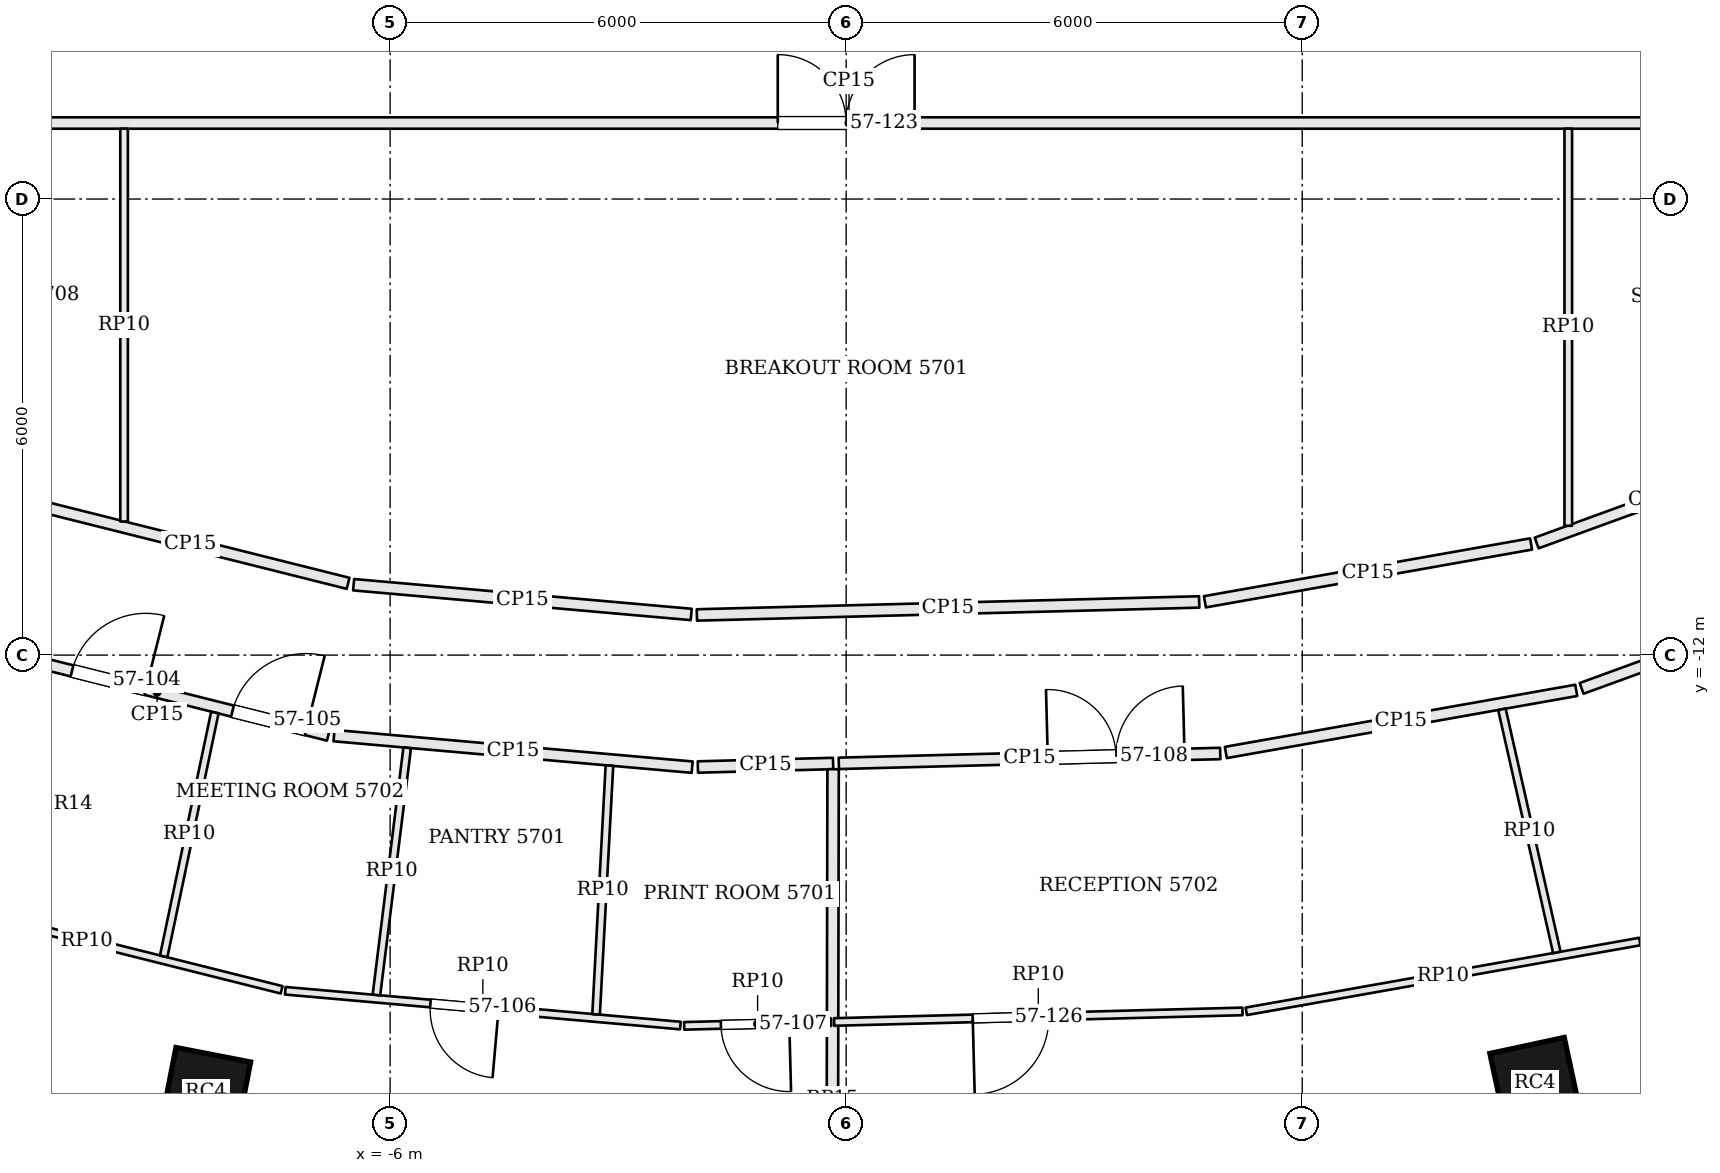
"""IFC4 building model, lengths in metres.
Left out: names, types, materials, properties, quantities, classifications, styles, units other than length and angle.
Written with IfcOpenShell. Run it as: python <this file> out.ifc"""

import sys

from ifc_helpers import new_model, si_unit, direction, frame, frame_2d, origin, origin_2d, place, context, subcontext, project, spatial, rectangle, extrude, element, fill, save


model = new_model("IFC4")
c1 = context("Model", 3, precision=1e-05, world=origin(), true_north=direction((0.0, 1.0)))
c2 = subcontext(c1, "Body", "Model", "MODEL_VIEW")
j1 = project(units=[si_unit("LENGTHUNIT", "METRE"), si_unit("PLANEANGLEUNIT", "RADIAN")], contexts=[c1])
p1 = place(None, origin())
s1 = spatial("IfcSite", under=j1, at=p1, CompositionType="ELEMENT")
p2 = place(p1, origin())
s2 = spatial("IfcBuilding", under=s1, at=p2, CompositionType="ELEMENT")
p3 = place(p2, frame((0.0, 0.0, 233.1)))
s3 = spatial("IfcBuildingStorey", under=s2, at=p3, CompositionType="ELEMENT", Elevation=233.1)
for number, where, z_axis, x_axis in (
    (1, (-8.422, -17.749, 0.0), (0.0, 0.0, 1.0), (0.982, -0.191, 0.0)),
    (2, (9.063, -17.625, 0.0), (0.0, 0.0, 1.0), (0.978, 0.21, 0.0)),
):
    element("IfcColumn", number, at=place(p3, frame(where, z_axis=z_axis, x_axis=x_axis)), inside=s3, PredefinedType="COLUMN", context=c2, shape_type="SweptSolid", body=[
        extrude(rectangle(XDim=1.0, YDim=1.0, at=origin_2d()), origin(), (0.0, 0.0, 1.0), 3.9),
    ])
p4 = place(p3, frame((-12.719, -17.526, 0.0), z_axis=(0.0, 0.0, 1.0), x_axis=(0.898643806462, -0.438679050226, 0.0)))
e3 = element("IfcWall", 3, at=p4, inside=s3, PredefinedType="SOLIDWALL", context=c2, shape_type="SweptSolid", body=[
    extrude(rectangle(XDim=2.523, YDim=0.45, at=frame_2d((1.262, 0.0))), origin(), (0.0, 0.0, 1.0), 3.7),
])
p5 = place(p4, frame((0.212, 0.0, 0.9)))
e4 = element("IfcOpeningElement", 4, at=p5, cuts=e3, PredefinedType="OPENING", context=c2, shape_type="SweptSolid", body=[
    extrude(rectangle(XDim=2.1, YDim=2.3, at=frame_2d((1.05, 1.15))), frame((0.0, 0.235, 0.0), z_axis=(0.0, -1.0, 0.0), x_axis=(1.0, 0.0, 0.0)), (0.0, 0.0, 1.0), 0.47),
])
p6 = place(p3, frame((-11.319, -11.923, 0.0), z_axis=(0.0, 0.0, 1.0), x_axis=(0.969990815038, -0.243141561114, 0.0)))
e5 = element("IfcWall", 5, at=p6, inside=s3, PredefinedType="PARTITIONING", context=c2, shape_type="SweptSolid", body=[
    extrude(rectangle(XDim=4.645, YDim=0.15, at=frame_2d((2.323, 0.0))), origin(), (0.0, 0.0, 1.0), 3.084),
])
p7 = place(p6, frame((1.169, 0.0, 0.0)))
e6 = element("IfcOpeningElement", 6, at=p7, cuts=e5, PredefinedType="OPENING", context=c2, shape_type="SweptSolid", body=[
    extrude(rectangle(XDim=1.0, YDim=2.4, at=frame_2d((0.5, 1.2))), frame((0.0, 0.085, 0.0), z_axis=(0.0, -1.0, 0.0), x_axis=(1.0, 0.0, 0.0)), (0.0, 0.0, 1.0), 0.17),
])
p8 = place(p6, frame((3.345, 0.0, 0.0)))
e7 = element("IfcOpeningElement", 7, at=p8, cuts=e5, PredefinedType="OPENING", context=c2, shape_type="SweptSolid", body=[
    extrude(rectangle(XDim=1.0, YDim=2.4, at=frame_2d((0.5, 1.2))), frame((0.0, 0.085, 0.0), z_axis=(0.0, -1.0, 0.0), x_axis=(1.0, 0.0, 0.0)), (0.0, 0.0, 1.0), 0.17),
])
p9 = place(p3, frame((-6.738, -13.059, 0.0), z_axis=(0.0, 0.0, 1.0), x_axis=(0.996143527037, -0.087738666181, 0.0)))
e8 = element("IfcWall", 8, at=p9, inside=s3, PredefinedType="PARTITIONING", context=c2, shape_type="SweptSolid", body=[
    extrude(rectangle(XDim=4.73, YDim=0.15, at=frame_2d((2.365, 0.0))), origin(), (0.0, 0.0, 1.0), 3.084),
])
p10 = place(p3, frame((-1.951, -13.472, 0.0), z_axis=(0.0, 0.0, 1.0), x_axis=(0.999660344096, 0.026061397555, 0.0)))
e9 = element("IfcWall", 9, at=p10, inside=s3, PredefinedType="PARTITIONING", context=c2, shape_type="SweptSolid", body=[
    extrude(rectangle(XDim=1.78, YDim=0.15, at=frame_2d((0.89, 0.0))), origin(), (0.0, 0.0, 1.0), 3.084),
])
p11 = place(p3, frame((-0.189, -22.19, 0.0), z_axis=(0.0, 0.0, 1.0), x_axis=(0.001966951348, 0.999998065549, 0.0)))
e10 = element("IfcWall", 10, at=p11, inside=s3, PredefinedType="PARTITIONING", context=c2, shape_type="SweptSolid", body=[
    extrude(rectangle(XDim=8.688, YDim=0.15, at=frame_2d((4.344, 0.0))), origin(), (0.0, 0.0, 1.0), 3.084),
])
p12 = place(p3, frame((-0.097, -13.424, 0.0), z_axis=(0.0, 0.0, 1.0), x_axis=(0.999663943149, 0.025922977605, 0.0)))
e11 = element("IfcWall", 11, at=p12, inside=s3, PredefinedType="PARTITIONING", context=c2, shape_type="SweptSolid", body=[
    extrude(rectangle(XDim=5.02, YDim=0.15, at=frame_2d((2.51, 0.0))), origin(), (0.0, 0.0, 1.0), 3.084),
])
p13 = place(p12, frame((2.75, 0.0, 0.0)))
e12 = element("IfcOpeningElement", 12, at=p13, cuts=e11, PredefinedType="OPENING", context=c2, shape_type="SweptSolid", body=[
    extrude(rectangle(XDim=1.8, YDim=2.1, at=frame_2d((0.9, 1.05))), frame((0.0, 0.085, 0.0), z_axis=(0.0, -1.0, 0.0), x_axis=(1.0, 0.0, 0.0)), (0.0, 0.0, 1.0), 0.17),
])
p14 = place(p3, frame((4.995, -13.281, 0.0), z_axis=(0.0, 0.0, 1.0), x_axis=(0.98463411377, 0.174630071865, 0.0)))
e13 = element("IfcWall", 13, at=p14, inside=s3, PredefinedType="PARTITIONING", context=c2, shape_type="SweptSolid", body=[
    extrude(rectangle(XDim=4.682, YDim=0.15, at=frame_2d((2.341, 0.0))), origin(), (0.0, 0.0, 1.0), 3.084),
])
p15 = place(p3, frame((9.676, -12.438, 0.0), z_axis=(0.0, 0.0, 1.0), x_axis=(0.939640289748, 0.342163887461, 0.0)))
e14 = element("IfcWall", 14, at=p15, inside=s3, PredefinedType="PARTITIONING", context=c2, shape_type="SweptSolid", body=[
    extrude(rectangle(XDim=3.68, YDim=0.15, at=frame_2d((1.84, 0.0))), origin(), (0.0, 0.0, 1.0), 3.084),
])
p16 = place(p15, frame((1.337, 0.0, 0.0)))
e15 = element("IfcOpeningElement", 15, at=p16, cuts=e14, PredefinedType="OPENING", context=c2, shape_type="SweptSolid", body=[
    extrude(rectangle(XDim=1.0, YDim=2.4, at=frame_2d((0.5, 1.2))), frame((0.0, 0.085, 0.0), z_axis=(0.0, -1.0, 0.0), x_axis=(1.0, 0.0, 0.0)), (0.0, 0.0, 1.0), 0.17),
])
p17 = place(p3, frame((12.178, -9.398, 0.0), z_axis=(0.0, 0.0, 1.0), x_axis=(-0.939609240084, -0.342249143093, 0.0)))
e16 = element("IfcWall", 16, at=p17, inside=s3, PredefinedType="PARTITIONING", context=c2, shape_type="SweptSolid", body=[
    extrude(rectangle(XDim=3.292, YDim=0.15, at=frame_2d((1.646, 0.0))), origin(), (0.0, 0.0, 1.0), 3.084),
])
p18 = place(p3, frame((9.01, -10.538, 0.0), z_axis=(0.0, 0.0, 1.0), x_axis=(-0.984645638575, -0.174565077936, 0.0)))
e17 = element("IfcWall", 17, at=p18, inside=s3, PredefinedType="PARTITIONING", context=c2, shape_type="SweptSolid", body=[
    extrude(rectangle(XDim=4.358, YDim=0.15, at=frame_2d((2.179, 0.0))), origin(), (0.0, 0.0, 1.0), 3.084),
])
p19 = place(p3, frame((4.645, -11.301, 0.0), z_axis=(0.0, 0.0, 1.0), x_axis=(-0.9996648469, -0.02588810291, 0.0)))
e18 = element("IfcWall", 18, at=p19, inside=s3, PredefinedType="PARTITIONING", context=c2, shape_type="SweptSolid", body=[
    extrude(rectangle(XDim=6.611, YDim=0.15, at=frame_2d((3.305, 0.0))), origin(), (0.0, 0.0, 1.0), 3.084),
])
p20 = place(p3, frame((-2.039, -11.465, 0.0), z_axis=(0.0, 0.0, 1.0), x_axis=(-0.996139855484, 0.087780341286, 0.0)))
e19 = element("IfcWall", 19, at=p20, inside=s3, PredefinedType="PARTITIONING", context=c2, shape_type="SweptSolid", body=[
    extrude(rectangle(XDim=4.458, YDim=0.15, at=frame_2d((2.229, 0.0))), origin(), (0.0, 0.0, 1.0), 3.084),
])
p21 = place(p3, frame((-6.553, -11.056, 0.0), z_axis=(0.0, 0.0, 1.0), x_axis=(-0.970004917182, 0.243085294995, 0.0)))
e20 = element("IfcWall", 20, at=p21, inside=s3, PredefinedType="PARTITIONING", context=c2, shape_type="SweptSolid", body=[
    extrude(rectangle(XDim=4.284, YDim=0.15, at=frame_2d((2.142, 0.0))), origin(), (0.0, 0.0, 1.0), 3.084),
])
p22 = place(p3, frame((-14.925, -5.0, 0.0), z_axis=(0.0, 0.0, 1.0), x_axis=(1.0, 0.0, 0.0)))
e21 = element("IfcWall", 21, at=p22, inside=s3, PredefinedType="PARTITIONING", context=c2, shape_type="SweptSolid", body=[
    extrude(rectangle(XDim=29.925, YDim=0.15, at=frame_2d((14.962, 0.0))), origin(), (0.0, 0.0, 1.0), 3.084),
])
p23 = place(p22, frame((2.175, 0.0, 0.0)))
e22 = element("IfcOpeningElement", 22, at=p23, cuts=e21, PredefinedType="OPENING", context=c2, shape_type="SweptSolid", body=[
    extrude(rectangle(XDim=1.0, YDim=2.4, at=frame_2d((0.5, 1.2))), frame((0.0, 0.085, 0.0), z_axis=(0.0, -1.0, 0.0), x_axis=(1.0, 0.0, 0.0)), (0.0, 0.0, 1.0), 0.17),
])
p24 = place(p22, frame((14.025, 0.0, 0.0)))
e23 = element("IfcOpeningElement", 23, at=p24, cuts=e21, PredefinedType="OPENING", context=c2, shape_type="SweptSolid", body=[
    extrude(rectangle(XDim=1.8, YDim=2.1, at=frame_2d((0.9, 1.05))), frame((0.0, 0.085, 0.0), z_axis=(0.0, -1.0, 0.0), x_axis=(1.0, 0.0, 0.0)), (0.0, 0.0, 1.0), 0.17),
])
p25 = place(p22, frame((26.825, 0.0, 0.0)))
e24 = element("IfcOpeningElement", 24, at=p25, cuts=e21, PredefinedType="OPENING", context=c2, shape_type="SweptSolid", body=[
    extrude(rectangle(XDim=0.7, YDim=2.1, at=frame_2d((0.35, 1.05))), frame((0.0, 0.085, 0.0), z_axis=(0.0, -1.0, 0.0), x_axis=(1.0, 0.0, 0.0)), (0.0, 0.0, 1.0), 0.17),
])
p26 = place(p3, frame((-0.198, -16.828, 0.0), z_axis=(0.0, 0.0, 1.0), x_axis=(-0.999665012606, -0.025881703408, 0.0)))
e25 = element("IfcWall", 25, at=p26, inside=s3, PredefinedType="PARTITIONING", context=c2, shape_type="SweptSolid", body=[
    extrude(rectangle(XDim=1.934, YDim=0.1, at=frame_2d((0.967, 0.0))), origin(), (0.0, 0.0, 1.0), 3.084),
])
p27 = place(p26, frame((0.55, 0.0, 0.0)))
e26 = element("IfcOpeningElement", 26, at=p27, cuts=e25, PredefinedType="OPENING", context=c2, shape_type="SweptSolid", body=[
    extrude(rectangle(XDim=0.9, YDim=2.1, at=frame_2d((0.45, 1.05))), frame((0.0, 0.06, 0.0), z_axis=(0.0, -1.0, 0.0), x_axis=(1.0, 0.0, 0.0)), (0.0, 0.0, 1.0), 0.12),
])
p28 = place(p3, frame((-2.181, -16.874, 0.0), z_axis=(0.0, 0.0, 1.0), x_axis=(-0.996143934904, 0.087734035321, 0.0)))
e27 = element("IfcWall", 27, at=p28, inside=s3, PredefinedType="PARTITIONING", context=c2, shape_type="SweptSolid", body=[
    extrude(rectangle(XDim=5.218, YDim=0.1, at=frame_2d((2.609, 0.0))), origin(), (0.0, 0.0, 1.0), 3.084),
])
p29 = place(p28, frame((2.401, 0.0, 0.0)))
e28 = element("IfcOpeningElement", 28, at=p29, cuts=e27, PredefinedType="OPENING", context=c2, shape_type="SweptSolid", body=[
    extrude(rectangle(XDim=0.9, YDim=2.1, at=frame_2d((0.45, 1.05))), frame((0.0, 0.06, 0.0), z_axis=(0.0, -1.0, 0.0), x_axis=(1.0, 0.0, 0.0)), (0.0, 0.0, 1.0), 0.12),
])
p30 = place(p3, frame((-7.427, -16.404, 0.0), z_axis=(0.0, 0.0, 1.0), x_axis=(-0.970009158253, 0.243068370845, 0.0)))
e29 = element("IfcWall", 29, at=p30, inside=s3, PredefinedType="PARTITIONING", context=c2, shape_type="SweptSolid", body=[
    extrude(rectangle(XDim=5.283, YDim=0.1, at=frame_2d((2.642, 0.0))), origin(), (0.0, 0.0, 1.0), 3.084),
])
p31 = place(p3, frame((-8.306, -12.756, 0.0), z_axis=(0.0, 0.0, 1.0), x_axis=(-0.205432339041, -0.978671320759, 0.0)))
e30 = element("IfcWall", 30, at=p31, inside=s3, PredefinedType="PARTITIONING", context=c2, shape_type="SweptSolid", body=[
    extrude(rectangle(XDim=3.278, YDim=0.1, at=frame_2d((1.639, 0.0))), origin(), (0.0, 0.0, 1.0), 3.084),
])
p32 = place(p3, frame((-5.775, -13.219, 0.0), z_axis=(0.0, 0.0, 1.0), x_axis=(-0.123512108853, -0.992343065158, 0.0)))
e31 = element("IfcWall", 31, at=p32, inside=s3, PredefinedType="PARTITIONING", context=c2, shape_type="SweptSolid", body=[
    extrude(rectangle(XDim=3.277, YDim=0.1, at=frame_2d((1.639, 0.0))), origin(), (0.0, 0.0, 1.0), 3.084),
])
p33 = place(p3, frame((-3.115, -13.454, 0.0), z_axis=(0.0, 0.0, 1.0), x_axis=(-0.053567684459, -0.99856422086, 0.0)))
e32 = element("IfcWall", 32, at=p33, inside=s3, PredefinedType="PARTITIONING", context=c2, shape_type="SweptSolid", body=[
    extrude(rectangle(XDim=3.277, YDim=0.1, at=frame_2d((1.638, 0.0))), origin(), (0.0, 0.0, 1.0), 3.084),
])
p34 = place(p3, frame((10.441, -15.769, 0.0), z_axis=(0.0, 0.0, 1.0), x_axis=(-0.984642067447, -0.174585219919, 0.0)))
e33 = element("IfcWall", 33, at=p34, inside=s3, PredefinedType="PARTITIONING", context=c2, shape_type="SweptSolid", body=[
    extrude(rectangle(XDim=5.258, YDim=0.1, at=frame_2d((2.629, 0.0))), origin(), (0.0, 0.0, 1.0), 3.084),
])
p35 = place(p3, frame((5.214, -16.688, 0.0), z_axis=(0.0, 0.0, 1.0), x_axis=(-0.999664711209, -0.025893342061, 0.0)))
e34 = element("IfcWall", 34, at=p35, inside=s3, PredefinedType="PARTITIONING", context=c2, shape_type="SweptSolid", body=[
    extrude(rectangle(XDim=5.374, YDim=0.1, at=frame_2d((2.687, 0.0))), origin(), (0.0, 0.0, 1.0), 3.084),
])
p36 = place(p35, frame((2.55, 0.0, 0.0)))
e35 = element("IfcOpeningElement", 35, at=p36, cuts=e34, PredefinedType="OPENING", context=c2, shape_type="SweptSolid", body=[
    extrude(rectangle(XDim=1.0, YDim=2.1, at=frame_2d((0.5, 1.05))), frame((0.0, 0.06, 0.0), z_axis=(0.0, -1.0, 0.0), x_axis=(1.0, 0.0, 0.0)), (0.0, 0.0, 1.0), 0.12),
])
p37 = place(p3, frame((8.627, -12.713, 0.0), z_axis=(0.0, 0.0, 1.0), x_axis=(0.220343151244, -0.975422419109, 0.0)))
e36 = element("IfcWall", 36, at=p37, inside=s3, PredefinedType="PARTITIONING", context=c2, shape_type="SweptSolid", body=[
    extrude(rectangle(XDim=3.279, YDim=0.1, at=frame_2d((1.639, 0.0))), origin(), (0.0, 0.0, 1.0), 3.084),
])
p38 = place(p3, frame((-9.5, -10.242, 0.0), z_axis=(0.0, 0.0, 1.0), x_axis=(0.0, 1.0, 0.0)))
e37 = element("IfcWall", 37, at=p38, inside=s3, PredefinedType="PARTITIONING", context=c2, shape_type="SweptSolid", body=[
    extrude(rectangle(XDim=5.167, YDim=0.1, at=frame_2d((2.583, 0.0))), origin(), (0.0, 0.0, 1.0), 3.084),
])
p39 = place(p3, frame((9.5, -10.299, 0.0), z_axis=(0.0, 0.0, 1.0), x_axis=(0.0, 1.0, 0.0)))
e38 = element("IfcWall", 38, at=p39, inside=s3, PredefinedType="PARTITIONING", context=c2, shape_type="SweptSolid", body=[
    extrude(rectangle(XDim=5.224, YDim=0.1, at=frame_2d((2.612, 0.0))), origin(), (0.0, 0.0, 1.0), 3.084),
])
p40 = place(p7, origin())
e39 = element("IfcDoor", 39, at=p40, inside=s3, OperationType="SINGLE_SWING_RIGHT", PredefinedType="DOOR", context=c2, shape_type="SweptSolid", body=[
    extrude(rectangle(XDim=1.0, YDim=2.4, at=frame_2d((0.5, 1.2))), frame((0.0, 0.025, 0.0), z_axis=(0.0, -1.0, 0.0), x_axis=(1.0, 0.0, 0.0)), (0.0, 0.0, 1.0), 0.05),
])
fill(e6, e39)
p41 = place(p8, origin())
e40 = element("IfcDoor", 40, at=p41, inside=s3, OperationType="SINGLE_SWING_RIGHT", PredefinedType="DOOR", context=c2, shape_type="SweptSolid", body=[
    extrude(rectangle(XDim=1.0, YDim=2.4, at=frame_2d((0.5, 1.2))), frame((0.0, 0.025, 0.0), z_axis=(0.0, -1.0, 0.0), x_axis=(1.0, 0.0, 0.0)), (0.0, 0.0, 1.0), 0.05),
])
fill(e7, e40)
p42 = place(p29, origin())
e41 = element("IfcDoor", 41, at=p42, inside=s3, OperationType="SINGLE_SWING_LEFT", PredefinedType="DOOR", context=c2, shape_type="SweptSolid", body=[
    extrude(rectangle(XDim=0.9, YDim=2.1, at=frame_2d((0.45, 1.05))), frame((0.0, 0.025, 0.0), z_axis=(0.0, -1.0, 0.0), x_axis=(1.0, 0.0, 0.0)), (0.0, 0.0, 1.0), 0.05),
])
fill(e28, e41)
p43 = place(p27, origin())
e42 = element("IfcDoor", 42, at=p43, inside=s3, OperationType="SINGLE_SWING_LEFT", PredefinedType="DOOR", context=c2, shape_type="SweptSolid", body=[
    extrude(rectangle(XDim=0.9, YDim=2.1, at=frame_2d((0.45, 1.05))), frame((0.0, 0.025, 0.0), z_axis=(0.0, -1.0, 0.0), x_axis=(1.0, 0.0, 0.0)), (0.0, 0.0, 1.0), 0.05),
])
fill(e26, e42)
p44 = place(p13, origin())
e43 = element("IfcDoor", 43, at=p44, inside=s3, OperationType="DOUBLE_DOOR_SINGLE_SWING", PredefinedType="DOOR", context=c2, shape_type="SweptSolid", body=[
    extrude(rectangle(XDim=1.8, YDim=2.1, at=frame_2d((0.9, 1.05))), frame((0.0, 0.025, 0.0), z_axis=(0.0, -1.0, 0.0), x_axis=(1.0, 0.0, 0.0)), (0.0, 0.0, 1.0), 0.05),
])
fill(e12, e43)
p45 = place(p24, origin())
e44 = element("IfcDoor", 44, at=p45, inside=s3, OperationType="DOUBLE_DOOR_SINGLE_SWING", PredefinedType="DOOR", context=c2, shape_type="SweptSolid", body=[
    extrude(rectangle(XDim=1.8, YDim=2.1, at=frame_2d((0.9, 1.05))), frame((0.0, 0.025, 0.0), z_axis=(0.0, -1.0, 0.0), x_axis=(1.0, 0.0, 0.0)), (0.0, 0.0, 1.0), 0.05),
])
fill(e23, e44)
p46 = place(p36, origin())
e45 = element("IfcDoor", 45, at=p46, inside=s3, OperationType="SINGLE_SWING_RIGHT", PredefinedType="DOOR", context=c2, shape_type="SweptSolid", body=[
    extrude(rectangle(XDim=1.0, YDim=2.1, at=frame_2d((0.5, 1.05))), frame((0.0, 0.025, 0.0), z_axis=(0.0, -1.0, 0.0), x_axis=(1.0, 0.0, 0.0)), (0.0, 0.0, 1.0), 0.05),
])
fill(e35, e45)
save(model, sys.argv[1])
